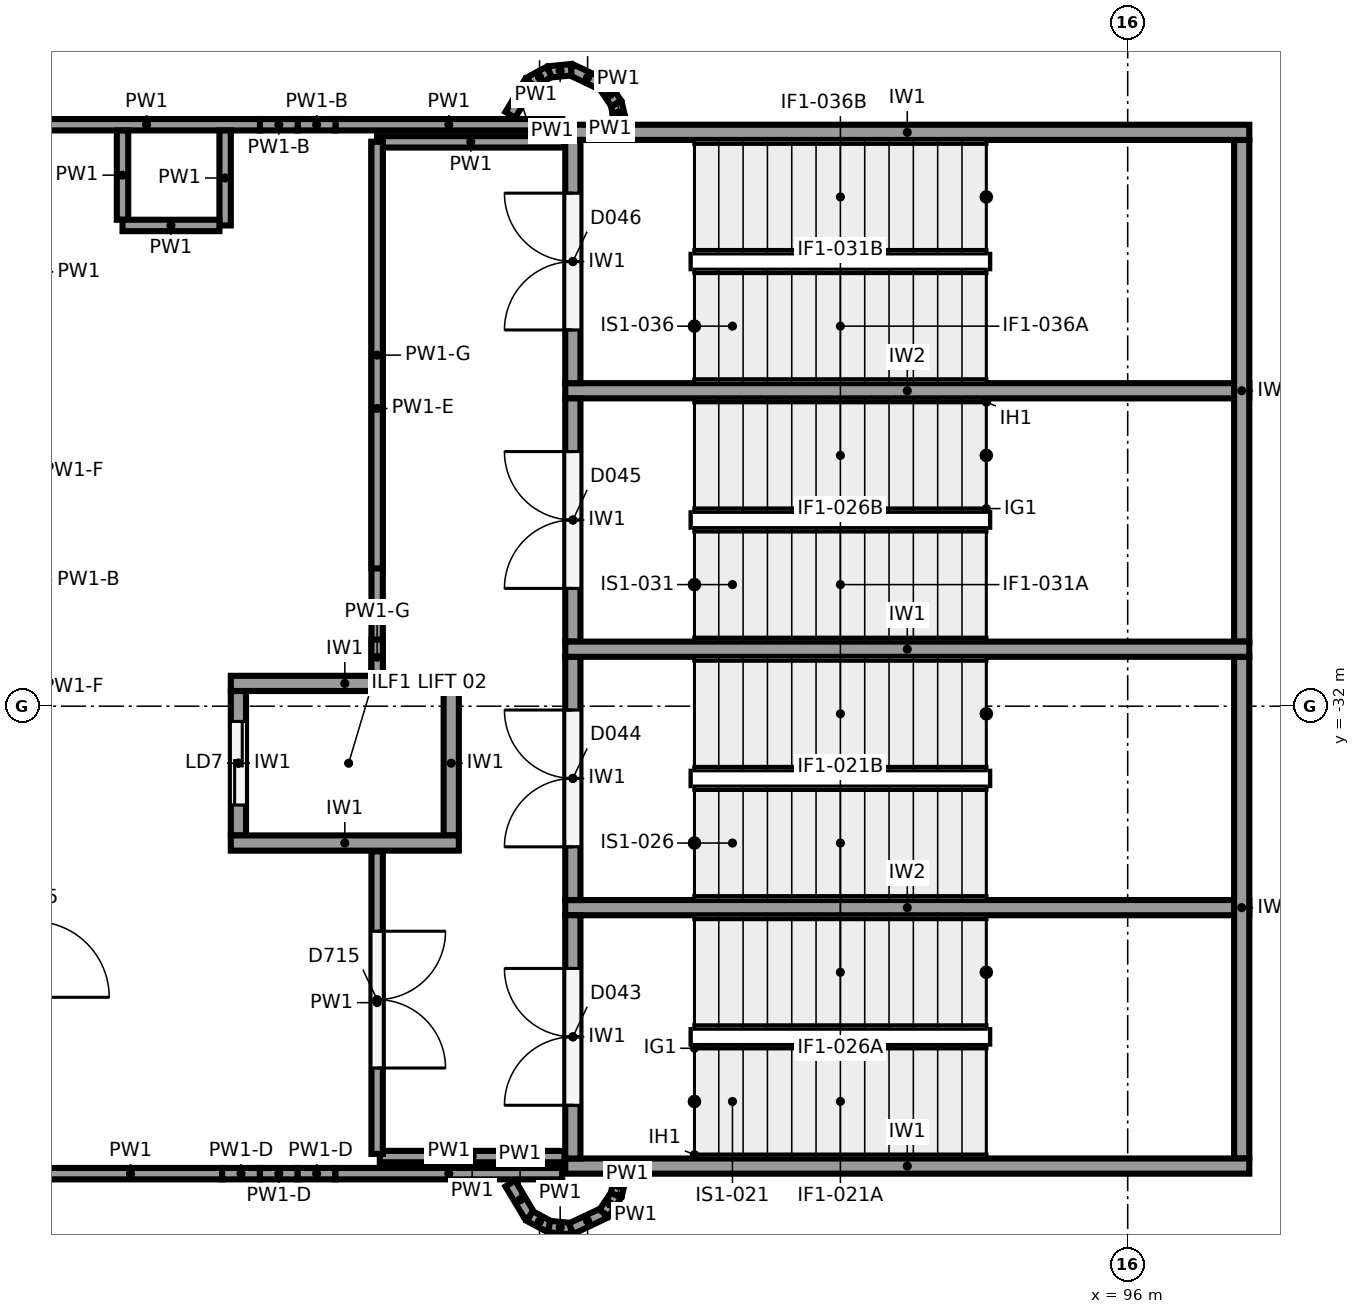
"""IFC4 building model, lengths in metres.
Left out: names, types, materials, properties, quantities, classifications, styles, units other than length and angle.
Written with IfcOpenShell. Run it as: python <this file> out.ifc"""

import sys

from ifc_helpers import new_model, si_unit, direction, frame, frame_2d, origin, origin_2d, place, context, subcontext, project, spatial, rectangle, circle, extrude, element, fill, save


model = new_model("IFC4")
c1 = context("Model", 3, precision=1e-05, world=origin(), true_north=direction((0.0, 1.0)))
c2 = subcontext(c1, "Body", "Model", "MODEL_VIEW")
j1 = project(units=[si_unit("LENGTHUNIT", "METRE"), si_unit("PLANEANGLEUNIT", "RADIAN")], contexts=[c1])
p1 = place(None, origin())
s1 = spatial("IfcSite", under=j1, at=p1, CompositionType="ELEMENT")
p2 = place(p1, origin())
s2 = spatial("IfcBuilding", under=s1, at=p2, CompositionType="ELEMENT")
p3 = place(p2, frame((0.0, 0.0, -4.0)))
s3 = spatial("IfcBuildingStorey", under=s2, at=p3, CompositionType="ELEMENT", Elevation=-4.0)
p4 = place(p3, frame((84.941, -30.404, -1.2), z_axis=(0.0, 0.0, 1.0), x_axis=(1.0, 0.0, 0.0)))
e1 = element("IfcColumn", 1, at=p4, inside=s3, PredefinedType="COLUMN", context=c2, shape_type="SweptSolid", body=[
    extrude(circle(Radius=0.6, at=origin_2d()), origin(), (0.0, 0.0, 1.0), 5.2),
])
for number, where, z_axis, x_axis in (
    (2, (97.6, -38.05, -1.2), (0.0, 0.0, 1.0), (-1.0, 0.0, 0.0)),
    (3, (97.6, -31.25, -1.2), (0.0, 0.0, 1.0), (-1.0, 0.0, 0.0)),
    (4, (97.6, -24.45, -1.2), (0.0, 0.0, 1.0), (-1.0, 0.0, 0.0)),
):
    element("IfcWall", number, at=place(p3, frame(where, z_axis=z_axis, x_axis=x_axis)), inside=s3, PredefinedType="SHEAR", context=c2, shape_type="SweptSolid", body=[
        extrude(rectangle(XDim=9.0, YDim=0.2, at=frame_2d((4.5, 0.0))), origin(), (0.0, 0.0, 1.0), 4.8),
    ])
for number, where, z_axis, x_axis in (
    (5, (97.5, -37.95, -1.2), (0.0, 0.0, 1.0), (0.0, 1.0, 0.0)),
    (6, (97.5, -31.15, -1.2), (0.0, 0.0, 1.0), (0.0, 1.0, 0.0)),
):
    element("IfcWall", number, at=place(p3, frame(where, z_axis=z_axis, x_axis=x_axis)), inside=s3, PredefinedType="SHEAR", context=c2, shape_type="SweptSolid", body=[
        extrude(rectangle(XDim=6.6, YDim=0.2, at=frame_2d((3.3, 0.0))), origin(), (0.0, 0.0, 1.0), 4.8),
    ])
for number, where, z_axis, x_axis in (
    (7, (97.6, -34.65, -1.2), (0.0, 0.0, 1.0), (-1.0, 0.0, 0.0)),
    (8, (97.6, -27.85, -1.2), (0.0, 0.0, 1.0), (-1.0, 0.0, 0.0)),
):
    element("IfcWall", number, at=place(p3, frame(where, z_axis=z_axis, x_axis=x_axis)), inside=s3, PredefinedType="SHEAR", context=c2, shape_type="SweptSolid", body=[
        extrude(rectangle(XDim=9.0, YDim=0.2, at=frame_2d((4.5, 0.0))), origin(), (0.0, 0.0, 1.0), 4.8),
    ])
p5 = place(p3, frame((88.7, -37.95, -1.2), z_axis=(0.0, 0.0, 1.0), x_axis=(0.0, 1.0, 0.0)))
e9 = element("IfcWall", 9, at=p5, inside=s3, PredefinedType="SHEAR", context=c2, shape_type="SweptSolid", body=[
    extrude(rectangle(XDim=3.2, YDim=0.2, at=frame_2d((1.6, 0.0))), origin(), (0.0, 0.0, 1.0), 4.8),
])
p6 = place(p5, frame((0.7, 0.0, 1.2)))
e10 = element("IfcOpeningElement", 10, at=p6, cuts=e9, PredefinedType="OPENING", context=c2, shape_type="SweptSolid", body=[
    extrude(rectangle(XDim=1.8, YDim=2.1, at=frame_2d((0.9, 1.05))), frame((0.0, 0.11, 0.0), z_axis=(0.0, -1.0, 0.0), x_axis=(1.0, 0.0, 0.0)), (0.0, 0.0, 1.0), 0.22),
])
p7 = place(p3, frame((88.7, -34.55, -1.2), z_axis=(0.0, 0.0, 1.0), x_axis=(0.0, 1.0, 0.0)))
e11 = element("IfcWall", 11, at=p7, inside=s3, PredefinedType="SHEAR", context=c2, shape_type="SweptSolid", body=[
    extrude(rectangle(XDim=3.2, YDim=0.2, at=frame_2d((1.6, 0.0))), origin(), (0.0, 0.0, 1.0), 4.8),
])
p8 = place(p7, frame((0.7, 0.0, 1.2)))
e12 = element("IfcOpeningElement", 12, at=p8, cuts=e11, PredefinedType="OPENING", context=c2, shape_type="SweptSolid", body=[
    extrude(rectangle(XDim=1.8, YDim=2.1, at=frame_2d((0.9, 1.05))), frame((0.0, 0.11, 0.0), z_axis=(0.0, -1.0, 0.0), x_axis=(1.0, 0.0, 0.0)), (0.0, 0.0, 1.0), 0.22),
])
p9 = place(p3, frame((88.7, -31.15, -1.2), z_axis=(0.0, 0.0, 1.0), x_axis=(0.0, 1.0, 0.0)))
e13 = element("IfcWall", 13, at=p9, inside=s3, PredefinedType="SHEAR", context=c2, shape_type="SweptSolid", body=[
    extrude(rectangle(XDim=3.2, YDim=0.2, at=frame_2d((1.6, 0.0))), origin(), (0.0, 0.0, 1.0), 4.8),
])
p10 = place(p9, frame((0.7, 0.0, 1.2)))
e14 = element("IfcOpeningElement", 14, at=p10, cuts=e13, PredefinedType="OPENING", context=c2, shape_type="SweptSolid", body=[
    extrude(rectangle(XDim=1.8, YDim=2.1, at=frame_2d((0.9, 1.05))), frame((0.0, 0.11, 0.0), z_axis=(0.0, -1.0, 0.0), x_axis=(1.0, 0.0, 0.0)), (0.0, 0.0, 1.0), 0.22),
])
p11 = place(p3, frame((88.7, -27.75, -1.2), z_axis=(0.0, 0.0, 1.0), x_axis=(0.0, 1.0, 0.0)))
e15 = element("IfcWall", 15, at=p11, inside=s3, PredefinedType="SHEAR", context=c2, shape_type="SweptSolid", body=[
    extrude(rectangle(XDim=3.2, YDim=0.2, at=frame_2d((1.6, 0.0))), origin(), (0.0, 0.0, 1.0), 4.8),
])
p12 = place(p11, frame((0.7, 0.0, 1.2)))
e16 = element("IfcOpeningElement", 16, at=p12, cuts=e15, PredefinedType="OPENING", context=c2, shape_type="SweptSolid", body=[
    extrude(rectangle(XDim=1.8, YDim=2.1, at=frame_2d((0.9, 1.05))), frame((0.0, 0.11, 0.0), z_axis=(0.0, -1.0, 0.0), x_axis=(1.0, 0.0, 0.0)), (0.0, 0.0, 1.0), 0.22),
])
for number, where, z_axis, x_axis in (
    (17, (87.2, -33.8, -1.2), (0.0, 0.0, 1.0), (-1.0, 0.0, 0.0)),
    (18, (87.2, -31.7, -1.2), (0.0, 0.0, 1.0), (-1.0, 0.0, 0.0)),
):
    element("IfcWall", number, at=place(p3, frame(where, z_axis=z_axis, x_axis=x_axis)), inside=s3, PredefinedType="SHEAR", context=c2, shape_type="SweptSolid", body=[
        extrude(rectangle(XDim=3.0, YDim=0.2, at=frame_2d((1.5, 0.0))), origin(), (0.0, 0.0, 1.0), 4.8),
    ])
p13 = place(p3, frame((87.1, -33.7, -1.2), z_axis=(0.0, 0.0, 1.0), x_axis=(0.0, 1.0, 0.0)))
e19 = element("IfcWall", 19, at=p13, inside=s3, PredefinedType="SHEAR", context=c2, shape_type="SweptSolid", body=[
    extrude(rectangle(XDim=1.9, YDim=0.2, at=frame_2d((0.95, 0.0))), origin(), (0.0, 0.0, 1.0), 4.8),
])
p14 = place(p3, frame((84.3, -33.7, -1.2), z_axis=(0.0, 0.0, 1.0), x_axis=(0.0, 1.0, 0.0)))
e20 = element("IfcWall", 20, at=p14, inside=s3, PredefinedType="SHEAR", context=c2, shape_type="SweptSolid", body=[
    extrude(rectangle(XDim=1.9, YDim=0.2, at=frame_2d((0.95, 0.0))), origin(), (0.0, 0.0, 1.0), 4.8),
])
p15 = place(p14, frame((0.4, 0.0, 1.2)))
e21 = element("IfcOpeningElement", 21, at=p15, cuts=e20, PredefinedType="OPENING", context=c2, shape_type="SweptSolid", body=[
    extrude(rectangle(XDim=1.1, YDim=2.1, at=frame_2d((0.55, 1.05))), frame((0.0, 0.11, 0.0), z_axis=(0.0, -1.0, 0.0), x_axis=(1.0, 0.0, 0.0)), (0.0, 0.0, 1.0), 0.22),
])
p16 = place(p3, frame((81.675, -38.15, 0.0), z_axis=(0.0, 0.0, 1.0), x_axis=(1.0, 0.0, 0.0)))
e22 = element("IfcWall", 22, at=p16, inside=s3, PredefinedType="PARTITIONING", context=c2, shape_type="SweptSolid", body=[
    extrude(rectangle(XDim=2.411, YDim=0.15, at=frame_2d((1.205, 0.0))), origin(), (0.0, 0.0, 1.0), 3.6),
])
p17 = place(p3, frame((84.086, -38.15, 0.0), z_axis=(0.0, 0.0, 1.0), x_axis=(1.0, 0.0, 0.0)))
e23 = element("IfcWall", 23, at=p17, inside=s3, PredefinedType="PARTITIONING", context=c2, shape_type="SweptSolid", body=[
    extrude(rectangle(XDim=0.497, YDim=0.15, at=frame_2d((0.249, 0.0))), origin(), (0.0, 0.0, 1.0), 2.3),
])
for number, where, z_axis, x_axis in (
    (24, (84.583, -38.15, 0.0), (0.0, 0.0, 1.0), (1.0, 0.0, 0.0)),
    (25, (85.08, -38.15, 0.0), (0.0, 0.0, 1.0), (1.0, 0.0, 0.0)),
):
    element("IfcWall", number, at=place(p3, frame(where, z_axis=z_axis, x_axis=x_axis)), inside=s3, PredefinedType="PARTITIONING", context=c2, shape_type="SweptSolid", body=[
        extrude(rectangle(XDim=0.497, YDim=0.15, at=frame_2d((0.249, 0.0))), origin(), (0.0, 0.0, 1.0), 2.3),
    ])
for number, where, z_axis, x_axis in (
    (26, (85.577, -38.15, 0.0), (0.0, 0.0, 1.0), (1.0, 0.0, 0.0)),
    (27, (88.56, -24.35, 0.0), (0.0, 0.0, 1.0), (-1.0, 0.0, 0.0)),
):
    element("IfcWall", number, at=place(p3, frame(where, z_axis=z_axis, x_axis=x_axis)), inside=s3, PredefinedType="PARTITIONING", context=c2, shape_type="SweptSolid", body=[
        extrude(rectangle(XDim=2.983, YDim=0.15, at=frame_2d((1.491, 0.0))), origin(), (0.0, 0.0, 1.0), 3.6),
    ])
for number, where, z_axis, x_axis in (
    (28, (85.577, -24.35, 0.0), (0.0, 0.0, 1.0), (-1.0, 0.0, 0.0)),
    (29, (85.08, -24.35, 0.0), (0.0, 0.0, 1.0), (-1.0, 0.0, 0.0)),
):
    element("IfcWall", number, at=place(p3, frame(where, z_axis=z_axis, x_axis=x_axis)), inside=s3, PredefinedType="PARTITIONING", context=c2, shape_type="SweptSolid", body=[
        extrude(rectangle(XDim=0.497, YDim=0.15, at=frame_2d((0.249, 0.0))), origin(), (0.0, 0.0, 1.0), 2.5),
    ])
p18 = place(p3, frame((84.583, -24.35, 0.0), z_axis=(0.0, 0.0, 1.0), x_axis=(-1.0, 0.0, 0.0)))
e30 = element("IfcWall", 30, at=p18, inside=s3, PredefinedType="PARTITIONING", context=c2, shape_type="SweptSolid", body=[
    extrude(rectangle(XDim=2.983, YDim=0.15, at=frame_2d((1.491, 0.0))), origin(), (0.0, 0.0, 1.0), 3.6),
])
p19 = place(p3, frame((84.125, -25.675, 0.0), z_axis=(0.0, 0.0, 1.0), x_axis=(0.0, 1.0, 0.0)))
e31 = element("IfcWall", 31, at=p19, inside=s3, PredefinedType="PARTITIONING", context=c2, shape_type="SweptSolid", body=[
    extrude(rectangle(XDim=1.249, YDim=0.15, at=frame_2d((0.625, 0.0))), origin(), (0.0, 0.0, 1.0), 3.6),
])
p20 = place(p3, frame((82.775, -24.426, 0.0), z_axis=(0.0, 0.0, 1.0), x_axis=(0.0, -1.0, 0.0)))
e32 = element("IfcWall", 32, at=p20, inside=s3, PredefinedType="PARTITIONING", context=c2, shape_type="SweptSolid", body=[
    extrude(rectangle(XDim=1.174, YDim=0.15, at=frame_2d((0.587, 0.0))), origin(), (0.0, 0.0, 1.0), 3.6),
])
p21 = place(p3, frame((82.775, -25.675, 0.0), z_axis=(0.0, 0.0, 1.0), x_axis=(1.0, 0.0, 0.0)))
e33 = element("IfcWall", 33, at=p21, inside=s3, PredefinedType="PARTITIONING", context=c2, shape_type="SweptSolid", body=[
    extrude(rectangle(XDim=1.275, YDim=0.15, at=frame_2d((0.638, 0.0))), origin(), (0.0, 0.0, 1.0), 3.6),
])
p22 = place(p3, frame((86.16, -37.925, 0.0), z_axis=(0.0, 0.0, 1.0), x_axis=(1.0, 0.0, 0.0)))
e34 = element("IfcWall", 34, at=p22, inside=s3, PredefinedType="PARTITIONING", context=c2, shape_type="SweptSolid", body=[
    extrude(rectangle(XDim=2.43, YDim=0.15, at=frame_2d((1.215, 0.0))), origin(), (0.0, 0.0, 1.0), 3.6),
])
p23 = place(p3, frame((88.59, -24.575, 0.0), z_axis=(0.0, 0.0, 1.0), x_axis=(-1.0, 0.0, 0.0)))
e35 = element("IfcWall", 35, at=p23, inside=s3, PredefinedType="PARTITIONING", context=c2, shape_type="SweptSolid", body=[
    extrude(rectangle(XDim=2.465, YDim=0.15, at=frame_2d((1.232, 0.0))), origin(), (0.0, 0.0, 1.0), 3.6),
])
p24 = place(p3, frame((86.125, -24.575, 0.0), z_axis=(0.0, 0.0, 1.0), x_axis=(0.0, -1.0, 0.0)))
e36 = element("IfcWall", 36, at=p24, inside=s3, PredefinedType="PARTITIONING", context=c2, shape_type="SweptSolid", body=[
    extrude(rectangle(XDim=7.015, YDim=0.15, at=frame_2d((3.508, 0.0))), origin(), (0.0, 0.0, 1.0), 2.85),
])
p25 = place(p3, frame((86.125, -24.575, 2.85), z_axis=(0.0, 0.0, 1.0), x_axis=(0.0, -1.0, 0.0)))
e37 = element("IfcWall", 37, at=p25, inside=s3, PredefinedType="PARTITIONING", context=c2, shape_type="SweptSolid", body=[
    extrude(rectangle(XDim=5.612, YDim=0.15, at=frame_2d((2.806, 0.0))), origin(), (0.0, 0.0, 1.0), 0.75),
])
p26 = place(p3, frame((86.125, -31.122, 2.85), z_axis=(0.0, 0.0, 1.0), x_axis=(0.0, -1.0, 0.0)))
e38 = element("IfcWall", 38, at=p26, inside=s3, PredefinedType="PARTITIONING", context=c2, shape_type="SweptSolid", body=[
    extrude(rectangle(XDim=0.468, YDim=0.15, at=frame_2d((0.234, 0.0))), origin(), (0.0, 0.0, 1.0), 0.75),
])
p27 = place(p3, frame((86.125, -33.91, 0.0), z_axis=(0.0, 0.0, 1.0), x_axis=(0.0, -1.0, 0.0)))
e39 = element("IfcWall", 39, at=p27, inside=s3, PredefinedType="PARTITIONING", context=c2, shape_type="SweptSolid", body=[
    extrude(rectangle(XDim=3.98, YDim=0.15, at=frame_2d((1.99, 0.0))), origin(), (0.0, 0.0, 1.0), 3.6),
])
p28 = place(p27, frame((1.05, 0.0, 0.0)))
e40 = element("IfcOpeningElement", 40, at=p28, cuts=e39, PredefinedType="OPENING", context=c2, shape_type="SweptSolid", body=[
    extrude(rectangle(XDim=1.8, YDim=2.1, at=frame_2d((0.9, 1.05))), frame((0.0, 0.085, 0.0), z_axis=(0.0, -1.0, 0.0), x_axis=(1.0, 0.0, 0.0)), (0.0, 0.0, 1.0), 0.17),
])
p29 = place(p3, frame((87.877, -38.279, 0.0), z_axis=(0.0, 0.0, 1.0), x_axis=(0.513060623194, -0.858352373404, 0.0)))
e41 = element("IfcWall", 41, at=p29, inside=s3, PredefinedType="PARTITIONING", context=c2, shape_type="SweptSolid", body=[
    extrude(rectangle(XDim=0.5, YDim=0.15, at=frame_2d((0.25, 0.0))), origin(), (0.0, 0.0, 1.0), 3.6),
])
for number, where, z_axis, x_axis in (
    (42, (88.134, -38.709, 0.0), (0.0, 0.0, 1.0), (0.882, -0.472, 0.0)),
    (43, (88.389, -38.845, 0.0), (0.0, 0.0, 1.0), (0.995, -0.098, 0.0)),
):
    element("IfcWall", number, at=place(p3, frame(where, z_axis=z_axis, x_axis=x_axis)), inside=s3, PredefinedType="PARTITIONING", context=c2, shape_type="SweptSolid", body=[
        extrude(rectangle(XDim=0.289, YDim=0.15, at=frame_2d((0.145, 0.0))), origin(), (0.0, 0.0, 1.0), 3.6),
    ])
p30 = place(p3, frame((88.677, -38.874, 0.0), z_axis=(0.0, 0.0, 1.0), x_axis=(0.90398642908, 0.427561148889, 0.0)))
e44 = element("IfcWall", 44, at=p30, inside=s3, PredefinedType="PARTITIONING", context=c2, shape_type="SweptSolid", body=[
    extrude(rectangle(XDim=0.48, YDim=0.15, at=frame_2d((0.24, 0.0))), origin(), (0.0, 0.0, 1.0), 3.6),
])
p31 = place(p3, frame((89.111, -38.668, 0.0), z_axis=(0.0, 0.0, 1.0), x_axis=(0.555678694372, 0.831397130511, 0.0)))
e45 = element("IfcWall", 45, at=p31, inside=s3, PredefinedType="PARTITIONING", context=c2, shape_type="SweptSolid", body=[
    extrude(rectangle(XDim=0.288, YDim=0.15, at=frame_2d((0.144, 0.0))), origin(), (0.0, 0.0, 1.0), 3.6),
])
for number, where, z_axis, x_axis in (
    (46, (89.271, -38.429, 0.0), (0.0, 0.0, 1.0), (0.23, 0.973, 0.0)),
    (47, (89.33, -24.322, 0.0), (0.0, 0.0, 1.0), (-0.23, 0.973, 0.0)),
):
    element("IfcWall", number, at=place(p3, frame(where, z_axis=z_axis, x_axis=x_axis)), inside=s3, PredefinedType="PARTITIONING", context=c2, shape_type="SweptSolid", body=[
        extrude(rectangle(XDim=0.258, YDim=0.15, at=frame_2d((0.129, 0.0))), origin(), (0.0, 0.0, 1.0), 3.6),
    ])
p32 = place(p3, frame((89.271, -24.071, 0.0), z_axis=(0.0, 0.0, 1.0), x_axis=(-0.555678694372, 0.831397130511, 0.0)))
e48 = element("IfcWall", 48, at=p32, inside=s3, PredefinedType="PARTITIONING", context=c2, shape_type="SweptSolid", body=[
    extrude(rectangle(XDim=0.288, YDim=0.15, at=frame_2d((0.144, 0.0))), origin(), (0.0, 0.0, 1.0), 3.6),
])
p33 = place(p3, frame((89.111, -23.832, 0.0), z_axis=(0.0, 0.0, 1.0), x_axis=(-0.90398642908, 0.427561148889, 0.0)))
e49 = element("IfcWall", 49, at=p33, inside=s3, PredefinedType="PARTITIONING", context=c2, shape_type="SweptSolid", body=[
    extrude(rectangle(XDim=0.48, YDim=0.15, at=frame_2d((0.24, 0.0))), origin(), (0.0, 0.0, 1.0), 3.6),
])
for number, where, z_axis, x_axis in (
    (50, (88.677, -23.626, 0.0), (0.0, 0.0, 1.0), (-0.995, -0.098, 0.0)),
    (51, (88.389, -23.655, 0.0), (0.0, 0.0, 1.0), (-0.882, -0.472, 0.0)),
):
    element("IfcWall", number, at=place(p3, frame(where, z_axis=z_axis, x_axis=x_axis)), inside=s3, PredefinedType="PARTITIONING", context=c2, shape_type="SweptSolid", body=[
        extrude(rectangle(XDim=0.289, YDim=0.15, at=frame_2d((0.145, 0.0))), origin(), (0.0, 0.0, 1.0), 3.6),
    ])
p34 = place(p3, frame((88.134, -23.791, 0.0), z_axis=(0.0, 0.0, 1.0), x_axis=(-0.513060623194, -0.858352373404, 0.0)))
e52 = element("IfcWall", 52, at=p34, inside=s3, PredefinedType="PARTITIONING", context=c2, shape_type="SweptSolid", body=[
    extrude(rectangle(XDim=0.5, YDim=0.15, at=frame_2d((0.25, 0.0))), origin(), (0.0, 0.0, 1.0), 3.6),
])
p35 = place(p6, origin())
e53 = element("IfcDoor", 53, at=p35, inside=s3, OperationType="DOUBLE_DOOR_SINGLE_SWING", PredefinedType="DOOR", context=c2, shape_type="SweptSolid", body=[
    extrude(rectangle(XDim=1.8, YDim=2.1, at=frame_2d((0.9, 1.05))), frame((0.0, 0.025, 0.0), z_axis=(0.0, -1.0, 0.0), x_axis=(1.0, 0.0, 0.0)), (0.0, 0.0, 1.0), 0.05),
])
fill(e10, e53)
p36 = place(p8, origin())
e54 = element("IfcDoor", 54, at=p36, inside=s3, OperationType="DOUBLE_DOOR_SINGLE_SWING", PredefinedType="DOOR", context=c2, shape_type="SweptSolid", body=[
    extrude(rectangle(XDim=1.8, YDim=2.1, at=frame_2d((0.9, 1.05))), frame((0.0, 0.025, 0.0), z_axis=(0.0, -1.0, 0.0), x_axis=(1.0, 0.0, 0.0)), (0.0, 0.0, 1.0), 0.05),
])
fill(e12, e54)
p37 = place(p10, origin())
e55 = element("IfcDoor", 55, at=p37, inside=s3, OperationType="DOUBLE_DOOR_SINGLE_SWING", PredefinedType="DOOR", context=c2, shape_type="SweptSolid", body=[
    extrude(rectangle(XDim=1.8, YDim=2.1, at=frame_2d((0.9, 1.05))), frame((0.0, 0.025, 0.0), z_axis=(0.0, -1.0, 0.0), x_axis=(1.0, 0.0, 0.0)), (0.0, 0.0, 1.0), 0.05),
])
fill(e14, e55)
p38 = place(p12, origin())
e56 = element("IfcDoor", 56, at=p38, inside=s3, OperationType="DOUBLE_DOOR_SINGLE_SWING", PredefinedType="DOOR", context=c2, shape_type="SweptSolid", body=[
    extrude(rectangle(XDim=1.8, YDim=2.1, at=frame_2d((0.9, 1.05))), frame((0.0, 0.025, 0.0), z_axis=(0.0, -1.0, 0.0), x_axis=(1.0, 0.0, 0.0)), (0.0, 0.0, 1.0), 0.05),
])
fill(e16, e56)
p39 = place(p15, origin())
e57 = element("IfcDoor", 57, at=p39, inside=s3, OperationType="SLIDING_TO_LEFT", PredefinedType="DOOR", context=c2, shape_type="SweptSolid", body=[
    extrude(rectangle(XDim=1.1, YDim=2.1, at=frame_2d((0.55, 1.05))), frame((0.0, 0.025, 0.0), z_axis=(0.0, -1.0, 0.0), x_axis=(1.0, 0.0, 0.0)), (0.0, 0.0, 1.0), 0.05),
])
fill(e21, e57)
p40 = place(p28, origin())
e58 = element("IfcDoor", 58, at=p40, inside=s3, OperationType="DOUBLE_DOOR_SINGLE_SWING", PredefinedType="DOOR", context=c2, shape_type="SweptSolid", body=[
    extrude(rectangle(XDim=1.8, YDim=2.1, at=frame_2d((0.9, 1.05))), frame((0.0, 0.025, 0.0), z_axis=(0.0, -1.0, 0.0), x_axis=(1.0, 0.0, 0.0)), (0.0, 0.0, 1.0), 0.05),
])
fill(e40, e58)
save(model, sys.argv[1])
